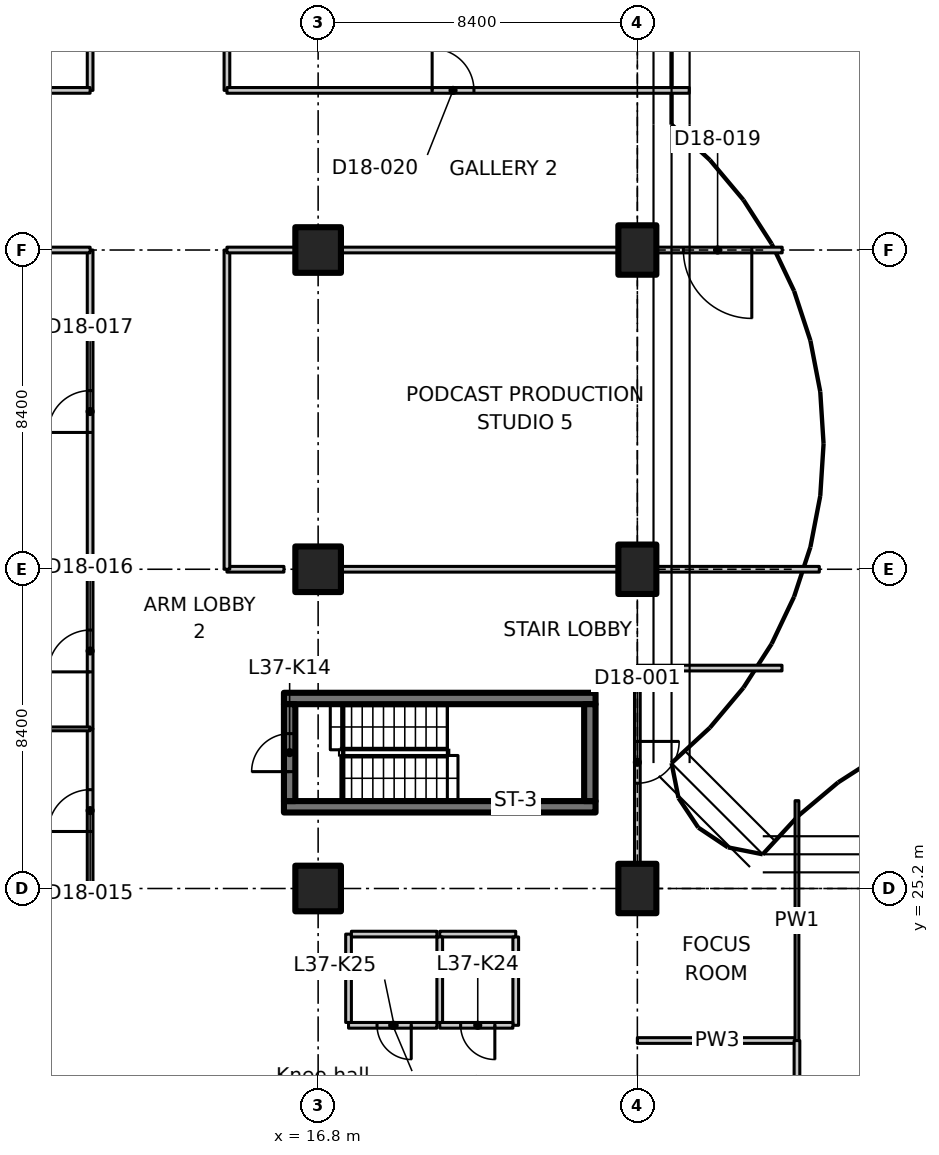
"""IFC4 building model, lengths in metres.
Left out: names, types, materials, properties, quantities, classifications, styles, units other than length and angle.
Written with IfcOpenShell. Run it as: python <this file> out.ifc"""

import sys

from ifc_helpers import new_model, si_unit, direction, frame, frame_2d, origin, origin_2d, place, context, subcontext, project, spatial, polyline, rectangle, outline, extrude, element, fill, save


model = new_model("IFC4")
c1 = context("Model", 3, precision=1e-05, world=origin(), true_north=direction((0.0, 1.0)))
c2 = subcontext(c1, "Body", "Model", "MODEL_VIEW")
j1 = project(units=[si_unit("LENGTHUNIT", "METRE"), si_unit("PLANEANGLEUNIT", "RADIAN")], contexts=[c1])
p1 = place(None, origin())
s1 = spatial("IfcSite", under=j1, at=p1, CompositionType="ELEMENT")
p2 = place(p1, origin())
s2 = spatial("IfcBuilding", under=s1, at=p2, CompositionType="ELEMENT")
p3 = place(p2, frame((0.0, 0.0, 149.3)))
s3 = spatial("IfcBuildingStorey", under=s2, at=p3, CompositionType="ELEMENT", Elevation=149.3)
for number, where, z_axis, x_axis in (
    (1, (16.8, 25.2, 0.0), (0.0, 0.0, 1.0), (1.0, 0.0, 0.0)),
    (2, (16.8, 33.6, 0.0), (0.0, 0.0, 1.0), (1.0, 0.0, 0.0)),
    (3, (16.8, 42.0, 0.0), (0.0, 0.0, 1.0), (1.0, 0.0, 0.0)),
):
    element("IfcColumn", number, at=place(p3, frame(where, z_axis=z_axis, x_axis=x_axis)), inside=s3, PredefinedType="COLUMN", context=c2, shape_type="SweptSolid", body=[
        extrude(rectangle(XDim=1.2, YDim=1.2, at=origin_2d()), origin(), (0.0, 0.0, 1.0), 3.35),
    ])
for number, where, z_axis, x_axis in (
    (4, (25.2, 25.2, 0.0), (0.0, 0.0, 1.0), (1.0, 0.0, 0.0)),
    (5, (25.2, 33.6, 0.0), (0.0, 0.0, 1.0), (1.0, 0.0, 0.0)),
    (6, (25.2, 42.0, 0.0), (0.0, 0.0, 1.0), (1.0, 0.0, 0.0)),
):
    element("IfcColumn", number, at=place(p3, frame(where, z_axis=z_axis, x_axis=x_axis)), inside=s3, PredefinedType="COLUMN", context=c2, shape_type="SweptSolid", body=[
        extrude(rectangle(XDim=1.0, YDim=1.3, at=origin_2d()), origin(), (0.0, 0.0, 1.0), 3.35),
    ])
for number, where, z_axis, x_axis in (
    (7, (15.9, 27.35, 0.0), (0.0, 0.0, 1.0), (1.0, 0.0, 0.0)),
    (8, (15.9, 30.2, 0.0), (0.0, 0.0, 1.0), (1.0, 0.0, 0.0)),
):
    element("IfcWall", number, at=place(p3, frame(where, z_axis=z_axis, x_axis=x_axis)), inside=s3, PredefinedType="SHEAR", context=c2, shape_type="SweptSolid", body=[
        extrude(rectangle(XDim=8.2, YDim=0.3, at=frame_2d((4.1, 0.0))), origin(), (0.0, 0.0, 1.0), 3.35),
    ])
p4 = place(p3, frame((16.05, 27.5, 0.0), z_axis=(0.0, 0.0, 1.0), x_axis=(0.0, 1.0, 0.0)))
e9 = element("IfcWall", 9, at=p4, inside=s3, PredefinedType="SHEAR", context=c2, shape_type="SweptSolid", body=[
    extrude(rectangle(XDim=2.55, YDim=0.3, at=frame_2d((1.275, 0.0))), origin(), (0.0, 0.0, 1.0), 3.35),
])
p5 = place(p4, frame((0.775, 0.0, 0.0)))
e10 = element("IfcOpeningElement", 10, at=p5, cuts=e9, PredefinedType="OPENING", context=c2, shape_type="SweptSolid", body=[
    extrude(rectangle(XDim=1.0, YDim=2.1, at=frame_2d((0.5, 1.05))), frame((0.0, 0.16, 0.0), z_axis=(0.0, -1.0, 0.0), x_axis=(1.0, 0.0, 0.0)), (0.0, 0.0, 1.0), 0.32),
])
p6 = place(p3, frame((23.95, 27.5, 0.0), z_axis=(0.0, 0.0, 1.0), x_axis=(0.0, 1.0, 0.0)))
e11 = element("IfcWall", 11, at=p6, inside=s3, PredefinedType="SHEAR", context=c2, shape_type="SweptSolid", body=[
    extrude(rectangle(XDim=2.55, YDim=0.3, at=frame_2d((1.275, 0.0))), origin(), (0.0, 0.0, 1.0), 3.35),
])
p7 = place(p3, frame((20.0, 24.0, 0.0), z_axis=(0.0, 0.0, 1.0), x_axis=(1.0, 0.0, 0.0)))
e12 = element("IfcWall", 12, at=p7, inside=s3, PredefinedType="PARTITIONING", context=c2, shape_type="SweptSolid", body=[
    extrude(rectangle(XDim=2.0, YDim=0.15, at=frame_2d((1.0, 0.0))), origin(), (0.0, 0.0, 1.0), 3.35),
])
p8 = place(p3, frame((22.0, 23.925, 0.0), z_axis=(0.0, 0.0, 1.0), x_axis=(0.0, -1.0, 0.0)))
e13 = element("IfcWall", 13, at=p8, inside=s3, PredefinedType="PARTITIONING", context=c2, shape_type="SweptSolid", body=[
    extrude(rectangle(XDim=2.325, YDim=0.15, at=frame_2d((1.163, 0.0))), origin(), (0.0, 0.0, 1.0), 3.35),
])
p9 = place(p3, frame((21.925, 21.6, 0.0), z_axis=(0.0, 0.0, 1.0), x_axis=(-1.0, 0.0, 0.0)))
e14 = element("IfcWall", 14, at=p9, inside=s3, PredefinedType="PARTITIONING", context=c2, shape_type="SweptSolid", body=[
    extrude(rectangle(XDim=1.925, YDim=0.15, at=frame_2d((0.962, 0.0))), origin(), (0.0, 0.0, 1.0), 3.35),
])
p10 = place(p9, frame((0.475, 0.0, 0.0)))
e15 = element("IfcOpeningElement", 15, at=p10, cuts=e14, PredefinedType="OPENING", context=c2, shape_type="SweptSolid", body=[
    extrude(rectangle(XDim=0.9, YDim=2.1, at=frame_2d((0.45, 1.05))), frame((0.0, 0.085, 0.0), z_axis=(0.0, -1.0, 0.0), x_axis=(1.0, 0.0, 0.0)), (0.0, 0.0, 1.0), 0.17),
])
p11 = place(p3, frame((20.0, 21.675, 0.0), z_axis=(0.0, 0.0, 1.0), x_axis=(0.0, 1.0, 0.0)))
e16 = element("IfcWall", 16, at=p11, inside=s3, PredefinedType="PARTITIONING", context=c2, shape_type="SweptSolid", body=[
    extrude(rectangle(XDim=2.25, YDim=0.15, at=frame_2d((1.125, 0.0))), origin(), (0.0, 0.0, 1.0), 3.35),
])
p12 = place(p3, frame((19.925, 21.6, 0.0), z_axis=(0.0, 0.0, 1.0), x_axis=(-1.0, 0.0, 0.0)))
e17 = element("IfcWall", 17, at=p12, inside=s3, PredefinedType="PARTITIONING", context=c2, shape_type="SweptSolid", body=[
    extrude(rectangle(XDim=2.325, YDim=0.15, at=frame_2d((1.163, 0.0))), origin(), (0.0, 0.0, 1.0), 3.35),
])
p13 = place(p12, frame((0.675, 0.0, 0.0)))
e18 = element("IfcOpeningElement", 18, at=p13, cuts=e17, PredefinedType="OPENING", context=c2, shape_type="SweptSolid", body=[
    extrude(rectangle(XDim=0.9, YDim=2.1, at=frame_2d((0.45, 1.05))), frame((0.0, 0.085, 0.0), z_axis=(0.0, -1.0, 0.0), x_axis=(1.0, 0.0, 0.0)), (0.0, 0.0, 1.0), 0.17),
])
p14 = place(p3, frame((17.6, 21.675, 0.0), z_axis=(0.0, 0.0, 1.0), x_axis=(0.0, 1.0, 0.0)))
e19 = element("IfcWall", 19, at=p14, inside=s3, PredefinedType="PARTITIONING", context=c2, shape_type="SweptSolid", body=[
    extrude(rectangle(XDim=2.325, YDim=0.15, at=frame_2d((1.163, 0.0))), origin(), (0.0, 0.0, 1.0), 3.35),
])
p15 = place(p3, frame((17.675, 24.0, 0.0), z_axis=(0.0, 0.0, 1.0), x_axis=(1.0, 0.0, 0.0)))
e20 = element("IfcWall", 20, at=p15, inside=s3, PredefinedType="PARTITIONING", context=c2, shape_type="SweptSolid", body=[
    extrude(rectangle(XDim=2.25, YDim=0.15, at=frame_2d((1.125, 0.0))), origin(), (0.0, 0.0, 1.0), 3.35),
])
p16 = place(p3, frame((25.2, 21.2, 0.0), z_axis=(0.0, 0.0, 1.0), x_axis=(1.0, 0.0, 0.0)))
e21 = element("IfcWall", 21, at=p16, inside=s3, PredefinedType="PARTITIONING", context=c2, shape_type="SweptSolid", body=[
    extrude(rectangle(XDim=4.2, YDim=0.15, at=frame_2d((2.1, 0.0))), origin(), (0.0, 0.0, 1.0), 3.33),
])
p17 = place(p3, frame((29.4, 21.2, 0.0), z_axis=(0.0, 0.0, 1.0), x_axis=(0.0, -1.0, 0.0)))
e22 = element("IfcWall", 22, at=p17, inside=s3, PredefinedType="PARTITIONING", context=c2, shape_type="SweptSolid", body=[
    extrude(rectangle(XDim=8.2, YDim=0.15, at=frame_2d((4.1, 0.0))), origin(), (0.0, 0.0, 1.0), 3.33),
])
p18 = place(p3, frame((29.4, 27.511, 0.0), z_axis=(0.0, 0.0, 1.0), x_axis=(0.0, -1.0, 0.0)))
e23 = element("IfcWall", 23, at=p18, inside=s3, PredefinedType="PARTITIONING", context=c2, shape_type="SweptSolid", body=[
    extrude(outline(polyline([(0.0, 0.0), (6.311, 0.0), (6.311, 3.33), (2.761, 3.33), (2.759, 2.98), (1.863, 2.98), (1.861, 3.33), (0.236, 3.33), (0.0, 3.33), (0.0, 0.0)])), frame((0.0, 0.05, 0.0), z_axis=(0.0, -1.0, 0.0), x_axis=(1.0, 0.0, 0.0)), (0.0, 0.0, 1.0), 0.1),
])
p19 = place(p3, frame((25.2, 31.0, 0.0), z_axis=(0.0, 0.0, 1.0), x_axis=(0.0, -1.0, 0.0)))
e24 = element("IfcWall", 24, at=p19, inside=s3, PredefinedType="PARTITIONING", context=c2, shape_type="SweptSolid", body=[
    extrude(outline(polyline([(0.0, 0.0), (5.13, 0.0), (5.13, 2.98), (0.0, 2.98), (0.0, 0.0)])), frame((0.0, 0.075, 0.0), z_axis=(0.0, -1.0, 0.0), x_axis=(1.0, 0.0, 0.0)), (0.0, 0.0, 1.0), 0.15),
])
p20 = place(p19, frame((1.93, 0.0, 0.0)))
e25 = element("IfcOpeningElement", 25, at=p20, cuts=e24, PredefinedType="OPENING", context=c2, shape_type="SweptSolid", body=[
    extrude(rectangle(XDim=1.1, YDim=2.1, at=frame_2d((0.55, 1.05))), frame((0.0, 0.085, 0.0), z_axis=(0.0, -1.0, 0.0), x_axis=(1.0, 0.0, 0.0)), (0.0, 0.0, 1.0), 0.17),
])
p21 = place(p3, frame((25.2, 31.0, 0.0), z_axis=(0.0, 0.0, 1.0), x_axis=(1.0, 0.0, 0.0)))
e26 = element("IfcWall", 26, at=p21, inside=s3, PredefinedType="PARTITIONING", context=c2, shape_type="SweptSolid", body=[
    extrude(rectangle(XDim=3.806, YDim=0.15, at=frame_2d((1.903, 0.0))), origin(), (0.0, 0.0, 1.0), 2.98),
])
p22 = place(p3, frame((10.8, 25.2, 0.0), z_axis=(0.0, 0.0, 1.0), x_axis=(0.0, 1.0, 0.0)))
e27 = element("IfcWall", 27, at=p22, inside=s3, PredefinedType="PARTITIONING", context=c2, shape_type="SweptSolid", body=[
    extrude(rectangle(XDim=4.2, YDim=0.15, at=frame_2d((2.1, 0.0))), origin(), (0.0, 0.0, 1.0), 3.33),
])
p23 = place(p22, frame((1.5, 0.0, 0.0)))
e28 = element("IfcOpeningElement", 28, at=p23, cuts=e27, PredefinedType="OPENING", context=c2, shape_type="SweptSolid", body=[
    extrude(rectangle(XDim=1.1, YDim=2.1, at=frame_2d((0.55, 1.05))), frame((0.0, 0.085, 0.0), z_axis=(0.0, -1.0, 0.0), x_axis=(1.0, 0.0, 0.0)), (0.0, 0.0, 1.0), 0.17),
])
p24 = place(p3, frame((10.8, 29.4, 0.0), z_axis=(0.0, 0.0, 1.0), x_axis=(0.0, 1.0, 0.0)))
e29 = element("IfcWall", 29, at=p24, inside=s3, PredefinedType="PARTITIONING", context=c2, shape_type="SweptSolid", body=[
    extrude(rectangle(XDim=4.2, YDim=0.15, at=frame_2d((2.1, 0.0))), origin(), (0.0, 0.0, 1.0), 3.33),
])
p25 = place(p24, frame((1.5, 0.0, 0.0)))
e30 = element("IfcOpeningElement", 30, at=p25, cuts=e29, PredefinedType="OPENING", context=c2, shape_type="SweptSolid", body=[
    extrude(rectangle(XDim=1.1, YDim=2.1, at=frame_2d((0.55, 1.05))), frame((0.0, 0.085, 0.0), z_axis=(0.0, -1.0, 0.0), x_axis=(1.0, 0.0, 0.0)), (0.0, 0.0, 1.0), 0.17),
])
p26 = place(p3, frame((14.4, 33.6, 0.0), z_axis=(0.0, 0.0, 1.0), x_axis=(1.0, 0.0, 0.0)))
e31 = element("IfcWall", 31, at=p26, inside=s3, PredefinedType="PARTITIONING", context=c2, shape_type="SweptSolid", body=[
    extrude(rectangle(XDim=1.5, YDim=0.15, at=frame_2d((0.75, 0.0))), origin(), (0.0, 0.0, 1.0), 3.33),
])
p27 = place(p3, frame((17.42, 33.6, 0.0), z_axis=(0.0, 0.0, 1.0), x_axis=(1.0, 0.0, 0.0)))
e32 = element("IfcWall", 32, at=p27, inside=s3, PredefinedType="PARTITIONING", context=c2, shape_type="SweptSolid", body=[
    extrude(rectangle(XDim=7.26, YDim=0.15, at=frame_2d((3.63, 0.0))), origin(), (0.0, 0.0, 1.0), 3.33),
])
p28 = place(p3, frame((25.72, 33.6, 0.0), z_axis=(0.0, 0.0, 1.0), x_axis=(1.0, 0.0, 0.0)))
e33 = element("IfcWall", 33, at=p28, inside=s3, PredefinedType="PARTITIONING", context=c2, shape_type="SweptSolid", body=[
    extrude(rectangle(XDim=4.268, YDim=0.15, at=frame_2d((2.134, 0.0))), origin(), (0.0, 0.0, 1.0), 2.98),
])
p29 = place(p3, frame((10.8, 33.6, 0.0), z_axis=(0.0, 0.0, 1.0), x_axis=(0.0, 1.0, 0.0)))
e34 = element("IfcWall", 34, at=p29, inside=s3, PredefinedType="PARTITIONING", context=c2, shape_type="SweptSolid", body=[
    extrude(rectangle(XDim=8.4, YDim=0.15, at=frame_2d((4.2, 0.0))), origin(), (0.0, 0.0, 1.0), 3.33),
])
p30 = place(p29, frame((3.6, 0.0, 0.0)))
e35 = element("IfcOpeningElement", 35, at=p30, cuts=e34, PredefinedType="OPENING", context=c2, shape_type="SweptSolid", body=[
    extrude(rectangle(XDim=1.1, YDim=2.1, at=frame_2d((0.55, 1.05))), frame((0.0, 0.085, 0.0), z_axis=(0.0, -1.0, 0.0), x_axis=(1.0, 0.0, 0.0)), (0.0, 0.0, 1.0), 0.17),
])
p31 = place(p3, frame((10.8, 46.2, 0.0), z_axis=(0.0, 0.0, 1.0), x_axis=(0.0, 1.0, 0.0)))
e36 = element("IfcWall", 36, at=p31, inside=s3, PredefinedType="PARTITIONING", context=c2, shape_type="SweptSolid", body=[
    extrude(rectangle(XDim=16.8, YDim=0.15, at=frame_2d((8.4, 0.0))), origin(), (0.0, 0.0, 1.0), 3.33),
])
p32 = place(p31, frame((7.5, 0.0, 0.0)))
e37 = element("IfcOpeningElement", 37, at=p32, cuts=e36, PredefinedType="OPENING", context=c2, shape_type="SweptSolid", body=[
    extrude(rectangle(XDim=2.0, YDim=2.4, at=frame_2d((1.0, 1.2))), frame((0.0, 0.085, 0.0), z_axis=(0.0, -1.0, 0.0), x_axis=(1.0, 0.0, 0.0)), (0.0, 0.0, 1.0), 0.17),
])
p33 = place(p3, frame((14.4, 42.0, 0.0), z_axis=(0.0, 0.0, 1.0), x_axis=(0.0, -1.0, 0.0)))
e38 = element("IfcWall", 38, at=p33, inside=s3, PredefinedType="PARTITIONING", context=c2, shape_type="SweptSolid", body=[
    extrude(rectangle(XDim=8.4, YDim=0.15, at=frame_2d((4.2, 0.0))), origin(), (0.0, 0.0, 1.0), 3.33),
])
p34 = place(p3, frame((14.4, 50.4, 0.0), z_axis=(0.0, 0.0, 1.0), x_axis=(0.0, -1.0, 0.0)))
e39 = element("IfcWall", 39, at=p34, inside=s3, PredefinedType="PARTITIONING", context=c2, shape_type="SweptSolid", body=[
    extrude(rectangle(XDim=4.2, YDim=0.15, at=frame_2d((2.1, 0.0))), origin(), (0.0, 0.0, 1.0), 3.33),
])
p35 = place(p3, frame((10.8, 42.0, 0.0), z_axis=(0.0, 0.0, 1.0), x_axis=(-1.0, 0.0, 0.0)))
e40 = element("IfcWall", 40, at=p35, inside=s3, PredefinedType="PARTITIONING", context=c2, shape_type="SweptSolid", body=[
    extrude(rectangle(XDim=1.78, YDim=0.15, at=frame_2d((0.89, 0.0))), origin(), (0.0, 0.0, 1.0), 3.33),
])
p36 = place(p3, frame((4.426, 46.2, 0.0), z_axis=(0.0, 0.0, 1.0), x_axis=(1.0, 0.0, 0.0)))
e41 = element("IfcWall", 41, at=p36, inside=s3, PredefinedType="PARTITIONING", context=c2, shape_type="SweptSolid", body=[
    extrude(outline(polyline([(0.0, 0.0), (6.374, 0.0), (6.374, 3.33), (1.624, 3.33), (1.622, 2.98), (0.726, 2.98), (0.724, 3.33), (0.074, 3.33), (0.0, 3.33), (0.0, 0.0)])), frame((0.0, 0.075, 0.0), z_axis=(0.0, -1.0, 0.0), x_axis=(1.0, 0.0, 0.0)), (0.0, 0.0, 1.0), 0.15),
])
p37 = place(p3, frame((-1.1, 29.4, 0.0), z_axis=(0.0, 0.0, 1.0), x_axis=(1.0, 0.0, 0.0)))
e42 = element("IfcWall", 42, at=p37, inside=s3, PredefinedType="PARTITIONING", context=c2, shape_type="SweptSolid", body=[
    extrude(outline(polyline([(0.0, 0.0), (11.9, 0.0), (11.9, 3.33), (1.55, 3.33), (1.548, 2.98), (0.652, 2.98), (0.65, 3.33), (0.0, 3.33), (0.0, 0.0)])), frame((0.0, 0.05, 0.0), z_axis=(0.0, -1.0, 0.0), x_axis=(1.0, 0.0, 0.0)), (0.0, 0.0, 1.0), 0.1),
])
p38 = place(p3, frame((9.02, 33.6, 0.0), z_axis=(0.0, 0.0, 1.0), x_axis=(1.0, 0.0, 0.0)))
e43 = element("IfcWall", 43, at=p38, inside=s3, PredefinedType="PARTITIONING", context=c2, shape_type="SweptSolid", body=[
    extrude(rectangle(XDim=1.78, YDim=0.1, at=frame_2d((0.89, 0.0))), origin(), (0.0, 0.0, 1.0), 3.33),
])
p39 = place(p3, frame((29.011, 42.0, 0.0), z_axis=(0.0, 0.0, 1.0), x_axis=(-1.0, 0.0, 0.0)))
e44 = element("IfcWall", 44, at=p39, inside=s3, PredefinedType="PARTITIONING", context=c2, shape_type="SweptSolid", body=[
    extrude(rectangle(XDim=3.292, YDim=0.15, at=frame_2d((1.646, 0.0))), origin(), (0.0, 0.0, 1.0), 2.98),
])
p40 = place(p39, frame((0.8, 0.0, 0.0)))
e45 = element("IfcOpeningElement", 45, at=p40, cuts=e44, PredefinedType="OPENING", context=c2, shape_type="SweptSolid", body=[
    extrude(rectangle(XDim=1.8, YDim=2.1, at=frame_2d((0.9, 1.05))), frame((0.0, 0.085, 0.0), z_axis=(0.0, -1.0, 0.0), x_axis=(1.0, 0.0, 0.0)), (0.0, 0.0, 1.0), 0.17),
])
p41 = place(p3, frame((24.68, 42.0, 0.0), z_axis=(0.0, 0.0, 1.0), x_axis=(-1.0, 0.0, 0.0)))
e46 = element("IfcWall", 46, at=p41, inside=s3, PredefinedType="PARTITIONING", context=c2, shape_type="SweptSolid", body=[
    extrude(rectangle(XDim=7.26, YDim=0.15, at=frame_2d((3.63, 0.0))), origin(), (0.0, 0.0, 1.0), 3.33),
])
p42 = place(p3, frame((16.18, 42.0, 0.0), z_axis=(0.0, 0.0, 1.0), x_axis=(-1.0, 0.0, 0.0)))
e47 = element("IfcWall", 47, at=p42, inside=s3, PredefinedType="PARTITIONING", context=c2, shape_type="SweptSolid", body=[
    extrude(rectangle(XDim=1.78, YDim=0.15, at=frame_2d((0.89, 0.0))), origin(), (0.0, 0.0, 1.0), 3.33),
])
p43 = place(p3, frame((14.4, 46.2, 0.0), z_axis=(0.0, 0.0, 1.0), x_axis=(1.0, 0.0, 0.0)))
e48 = element("IfcWall", 48, at=p43, inside=s3, PredefinedType="PARTITIONING", context=c2, shape_type="SweptSolid", body=[
    extrude(outline(polyline([(0.0, 0.0), (12.165, 0.0), (12.165, 3.33), (11.9, 3.33), (11.25, 3.33), (11.248, 2.98), (10.352, 2.98), (10.35, 3.33), (0.0, 3.33), (0.0, 0.0)])), frame((0.0, 0.075, 0.0), z_axis=(0.0, -1.0, 0.0), x_axis=(1.0, 0.0, 0.0)), (0.0, 0.0, 1.0), 0.15),
])
p44 = place(p43, frame((5.4, 0.0, 0.0)))
e49 = element("IfcOpeningElement", 49, at=p44, cuts=e48, PredefinedType="OPENING", context=c2, shape_type="SweptSolid", body=[
    extrude(rectangle(XDim=1.1, YDim=2.1, at=frame_2d((0.55, 1.05))), frame((0.0, 0.085, 0.0), z_axis=(0.0, -1.0, 0.0), x_axis=(1.0, 0.0, 0.0)), (0.0, 0.0, 1.0), 0.17),
])
p45 = place(p5, origin())
e50 = element("IfcDoor", 50, at=p45, inside=s3, OperationType="SINGLE_SWING_RIGHT", PredefinedType="DOOR", context=c2, shape_type="SweptSolid", body=[
    extrude(rectangle(XDim=1.0, YDim=2.1, at=frame_2d((0.5, 1.05))), frame((0.0, 0.025, 0.0), z_axis=(0.0, -1.0, 0.0), x_axis=(1.0, 0.0, 0.0)), (0.0, 0.0, 1.0), 0.05),
])
fill(e10, e50)
p46 = place(p10, origin())
e51 = element("IfcDoor", 51, at=p46, inside=s3, OperationType="SINGLE_SWING_RIGHT", PredefinedType="DOOR", context=c2, shape_type="SweptSolid", body=[
    extrude(rectangle(XDim=0.9, YDim=2.1, at=frame_2d((0.45, 1.05))), frame((0.0, 0.025, 0.0), z_axis=(0.0, -1.0, 0.0), x_axis=(1.0, 0.0, 0.0)), (0.0, 0.0, 1.0), 0.05),
])
fill(e15, e51)
p47 = place(p13, origin())
e52 = element("IfcDoor", 52, at=p47, inside=s3, OperationType="SINGLE_SWING_LEFT", PredefinedType="DOOR", context=c2, shape_type="SweptSolid", body=[
    extrude(rectangle(XDim=0.9, YDim=2.1, at=frame_2d((0.45, 1.05))), frame((0.0, 0.025, 0.0), z_axis=(0.0, -1.0, 0.0), x_axis=(1.0, 0.0, 0.0)), (0.0, 0.0, 1.0), 0.05),
])
fill(e18, e52)
p48 = place(p20, origin())
e53 = element("IfcDoor", 53, at=p48, inside=s3, OperationType="SINGLE_SWING_RIGHT", PredefinedType="DOOR", context=c2, shape_type="SweptSolid", body=[
    extrude(rectangle(XDim=1.1, YDim=2.1, at=frame_2d((0.55, 1.05))), frame((0.0, 0.025, 0.0), z_axis=(0.0, -1.0, 0.0), x_axis=(1.0, 0.0, 0.0)), (0.0, 0.0, 1.0), 0.05),
])
fill(e25, e53)
p49 = place(p23, origin())
e54 = element("IfcDoor", 54, at=p49, inside=s3, OperationType="SINGLE_SWING_LEFT", PredefinedType="DOOR", context=c2, shape_type="SweptSolid", body=[
    extrude(rectangle(XDim=1.1, YDim=2.1, at=frame_2d((0.55, 1.05))), frame((0.0, 0.025, 0.0), z_axis=(0.0, -1.0, 0.0), x_axis=(1.0, 0.0, 0.0)), (0.0, 0.0, 1.0), 0.05),
])
fill(e28, e54)
p50 = place(p25, origin())
e55 = element("IfcDoor", 55, at=p50, inside=s3, OperationType="SINGLE_SWING_LEFT", PredefinedType="DOOR", context=c2, shape_type="SweptSolid", body=[
    extrude(rectangle(XDim=1.1, YDim=2.1, at=frame_2d((0.55, 1.05))), frame((0.0, 0.025, 0.0), z_axis=(0.0, -1.0, 0.0), x_axis=(1.0, 0.0, 0.0)), (0.0, 0.0, 1.0), 0.05),
])
fill(e30, e55)
p51 = place(p30, origin())
e56 = element("IfcDoor", 56, at=p51, inside=s3, OperationType="SINGLE_SWING_LEFT", PredefinedType="DOOR", context=c2, shape_type="SweptSolid", body=[
    extrude(rectangle(XDim=1.1, YDim=2.1, at=frame_2d((0.55, 1.05))), frame((0.0, 0.025, 0.0), z_axis=(0.0, -1.0, 0.0), x_axis=(1.0, 0.0, 0.0)), (0.0, 0.0, 1.0), 0.05),
])
fill(e35, e56)
p52 = place(p40, origin())
e57 = element("IfcDoor", 57, at=p52, inside=s3, OperationType="DOUBLE_DOOR_SINGLE_SWING", PredefinedType="DOOR", context=c2, shape_type="SweptSolid", body=[
    extrude(rectangle(XDim=1.8, YDim=2.1, at=frame_2d((0.9, 1.05))), frame((0.0, 0.025, 0.0), z_axis=(0.0, -1.0, 0.0), x_axis=(1.0, 0.0, 0.0)), (0.0, 0.0, 1.0), 0.05),
])
fill(e45, e57)
p53 = place(p44, origin())
e58 = element("IfcDoor", 58, at=p53, inside=s3, OperationType="SINGLE_SWING_LEFT", PredefinedType="DOOR", context=c2, shape_type="SweptSolid", body=[
    extrude(rectangle(XDim=1.1, YDim=2.1, at=frame_2d((0.55, 1.05))), frame((0.0, 0.025, 0.0), z_axis=(0.0, -1.0, 0.0), x_axis=(1.0, 0.0, 0.0)), (0.0, 0.0, 1.0), 0.05),
])
fill(e49, e58)
save(model, sys.argv[1])
